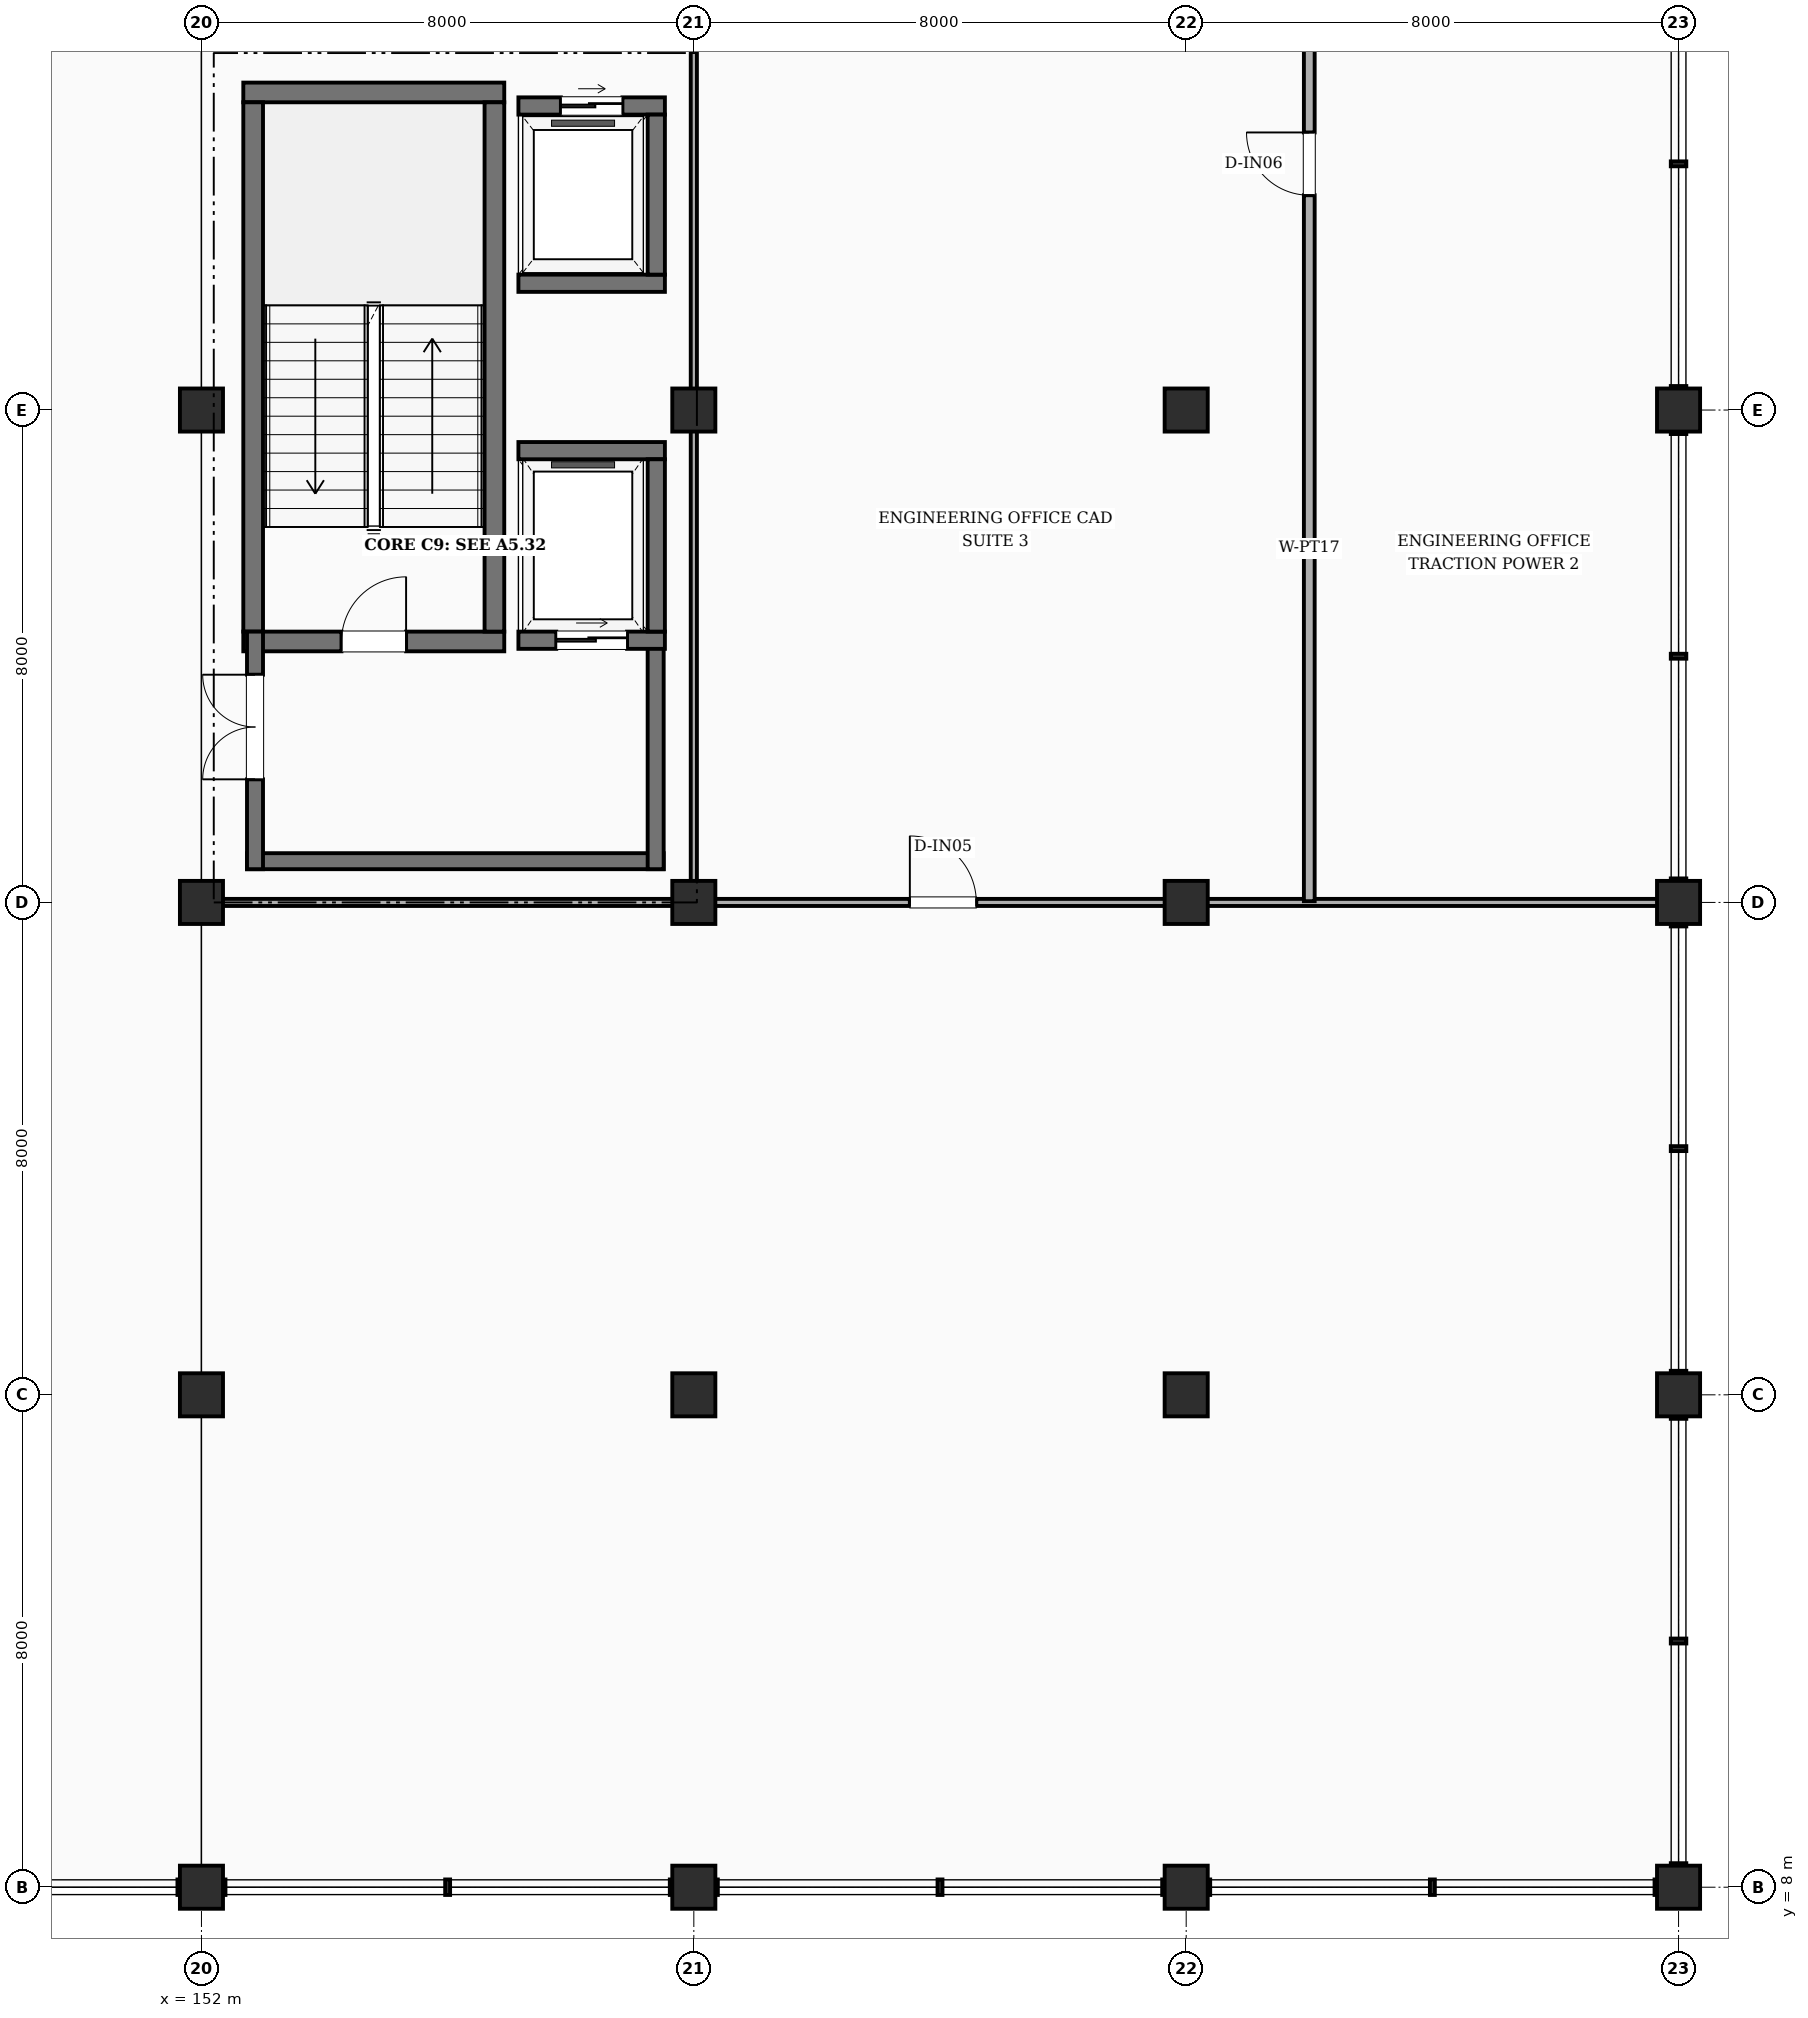
"""IFC4 building model, lengths in metres.
Left out: names, types, materials, properties, quantities, classifications, styles, units other than length and angle.
Written with IfcOpenShell. Run it as: python <this file> out.ifc"""

import sys

from ifc_helpers import new_model, si_unit, direction, frame, frame_2d, origin, origin_2d, place, context, subcontext, project, spatial, rectangle, extrude, element, fill, save


model = new_model("IFC4")
c1 = context("Model", 3, precision=1e-05, world=origin(), true_north=direction((0.0, 1.0)))
c2 = subcontext(c1, "Body", "Model", "MODEL_VIEW")
j1 = project(units=[si_unit("LENGTHUNIT", "METRE"), si_unit("PLANEANGLEUNIT", "RADIAN")], contexts=[c1])
p1 = place(None, origin())
s1 = spatial("IfcSite", under=j1, at=p1, CompositionType="ELEMENT")
p2 = place(p1, origin())
s2 = spatial("IfcBuilding", under=s1, at=p2, CompositionType="ELEMENT")
p3 = place(p2, frame((0.0, 0.0, 10.8)))
s3 = spatial("IfcBuildingStorey", under=s2, at=p3, CompositionType="ELEMENT", Elevation=10.8)
for number, where, z_axis, x_axis in (
    (1, (152.0, 8.0, 0.0), (0.0, 0.0, 1.0), (1.0, 0.0, 0.0)),
    (2, (152.0, 16.0, 0.0), (0.0, 0.0, 1.0), (1.0, 0.0, 0.0)),
    (3, (152.0, 24.0, 0.0), (0.0, 0.0, 1.0), (1.0, 0.0, 0.0)),
    (4, (152.0, 32.0, 0.0), (0.0, 0.0, 1.0), (1.0, 0.0, 0.0)),
    (5, (160.0, 8.0, 0.0), (0.0, 0.0, 1.0), (1.0, 0.0, 0.0)),
    (6, (160.0, 16.0, 0.0), (0.0, 0.0, 1.0), (1.0, 0.0, 0.0)),
    (7, (160.0, 24.0, 0.0), (0.0, 0.0, 1.0), (1.0, 0.0, 0.0)),
    (8, (160.0, 32.0, 0.0), (0.0, 0.0, 1.0), (1.0, 0.0, 0.0)),
    (9, (168.0, 8.0, 0.0), (0.0, 0.0, 1.0), (1.0, 0.0, 0.0)),
    (10, (168.0, 16.0, 0.0), (0.0, 0.0, 1.0), (1.0, 0.0, 0.0)),
    (11, (168.0, 24.0, 0.0), (0.0, 0.0, 1.0), (1.0, 0.0, 0.0)),
    (12, (168.0, 32.0, 0.0), (0.0, 0.0, 1.0), (1.0, 0.0, 0.0)),
    (13, (176.0, 8.0, 0.0), (0.0, 0.0, 1.0), (1.0, 0.0, 0.0)),
    (14, (176.0, 16.0, 0.0), (0.0, 0.0, 1.0), (1.0, 0.0, 0.0)),
    (15, (176.0, 24.0, 0.0), (0.0, 0.0, 1.0), (1.0, 0.0, 0.0)),
    (16, (176.0, 32.0, 0.0), (0.0, 0.0, 1.0), (1.0, 0.0, 0.0)),
):
    element("IfcColumn", number, at=place(p3, frame(where, z_axis=z_axis, x_axis=x_axis)), inside=s3, PredefinedType="COLUMN", context=c2, shape_type="SweptSolid", body=[
        extrude(rectangle(XDim=0.7, YDim=0.7, at=origin_2d()), origin(), (0.0, 0.0, 1.0), 4.2),
    ])
p4 = place(p3, frame((152.68, 28.24, 0.0), z_axis=(0.0, 0.0, 1.0), x_axis=(1.0, 0.0, 0.0)))
e17 = element("IfcWall", 17, at=p4, inside=s3, PredefinedType="SHEAR", context=c2, shape_type="SweptSolid", body=[
    extrude(rectangle(XDim=4.24, YDim=0.32, at=frame_2d((2.12, 0.0))), origin(), (0.0, 0.0, 1.0), 4.2),
])
p5 = place(p4, frame((1.595, 0.0, 0.0)))
e18 = element("IfcOpeningElement", 18, at=p5, cuts=e17, PredefinedType="OPENING", context=c2, shape_type="SweptSolid", body=[
    extrude(rectangle(XDim=1.05, YDim=2.15, at=frame_2d((0.525, 1.075))), frame((0.0, 0.17, 0.0), z_axis=(0.0, -1.0, 0.0), x_axis=(1.0, 0.0, 0.0)), (0.0, 0.0, 1.0), 0.34),
])
p6 = place(p3, frame((152.68, 37.16, 0.0), z_axis=(0.0, 0.0, 1.0), x_axis=(1.0, 0.0, 0.0)))
e19 = element("IfcWall", 19, at=p6, inside=s3, PredefinedType="SHEAR", context=c2, shape_type="SweptSolid", body=[
    extrude(rectangle(XDim=4.24, YDim=0.32, at=frame_2d((2.12, 0.0))), origin(), (0.0, 0.0, 1.0), 4.2),
])
for number, where, z_axis, x_axis in (
    (20, (152.84, 28.4, 0.0), (0.0, 0.0, 1.0), (0.0, 1.0, 0.0)),
    (21, (156.76, 28.4, 0.0), (0.0, 0.0, 1.0), (0.0, 1.0, 0.0)),
):
    element("IfcWall", number, at=place(p3, frame(where, z_axis=z_axis, x_axis=x_axis)), inside=s3, PredefinedType="SHEAR", context=c2, shape_type="SweptSolid", body=[
        extrude(rectangle(XDim=8.6, YDim=0.32, at=frame_2d((4.3, 0.0))), origin(), (0.0, 0.0, 1.0), 4.2),
    ])
p7 = place(p3, frame((159.51, 24.67, 0.0), z_axis=(0.0, 0.0, 1.0), x_axis=(-1.0, 0.0, 0.0)))
e22 = element("IfcWall", 22, at=p7, inside=s3, PredefinedType="SHEAR", context=c2, shape_type="SweptSolid", body=[
    extrude(rectangle(XDim=6.77, YDim=0.26, at=frame_2d((3.385, 0.0))), origin(), (0.0, 0.0, 1.0), 4.2),
])
p8 = place(p3, frame((152.87, 24.54, 0.0), z_axis=(0.0, 0.0, 1.0), x_axis=(0.0, 1.0, 0.0)))
e23 = element("IfcWall", 23, at=p8, inside=s3, PredefinedType="SHEAR", context=c2, shape_type="SweptSolid", body=[
    extrude(rectangle(XDim=3.86, YDim=0.26, at=frame_2d((1.93, 0.0))), origin(), (0.0, 0.0, 1.0), 4.2),
])
p9 = place(p8, frame((1.46, 0.0, 0.0)))
e24 = element("IfcOpeningElement", 24, at=p9, cuts=e23, PredefinedType="OPENING", context=c2, shape_type="SweptSolid", body=[
    extrude(rectangle(XDim=1.7, YDim=2.2, at=frame_2d((0.85, 1.1))), frame((0.0, 0.14, 0.0), z_axis=(0.0, -1.0, 0.0), x_axis=(1.0, 0.0, 0.0)), (0.0, 0.0, 1.0), 0.28),
])
p10 = place(p3, frame((159.38, 24.54, 0.0), z_axis=(0.0, 0.0, 1.0), x_axis=(0.0, 1.0, 0.0)))
e25 = element("IfcWall", 25, at=p10, inside=s3, PredefinedType="SHEAR", context=c2, shape_type="SweptSolid", body=[
    extrude(rectangle(XDim=3.86, YDim=0.26, at=frame_2d((1.93, 0.0))), origin(), (0.0, 0.0, 1.0), 4.2),
])
p11 = place(p3, frame((157.15, 28.26, 0.0), z_axis=(0.0, 0.0, 1.0), x_axis=(1.0, 0.0, 0.0)))
e26 = element("IfcWall", 26, at=p11, inside=s3, PredefinedType="SHEAR", context=c2, shape_type="SweptSolid", body=[
    extrude(rectangle(XDim=2.38, YDim=0.28, at=frame_2d((1.19, 0.0))), origin(), (0.0, 0.0, 1.0), 4.2),
])
p12 = place(p11, frame((0.615, 0.0, 0.0)))
e27 = element("IfcOpeningElement", 27, at=p12, cuts=e26, PredefinedType="OPENING", context=c2, shape_type="SweptSolid", body=[
    extrude(rectangle(XDim=1.15, YDim=2.2, at=frame_2d((0.575, 1.1))), frame((0.0, 0.15, 0.0), z_axis=(0.0, -1.0, 0.0), x_axis=(1.0, 0.0, 0.0)), (0.0, 0.0, 1.0), 0.3),
])
p13 = place(p3, frame((157.15, 31.34, 0.0), z_axis=(0.0, 0.0, 1.0), x_axis=(1.0, 0.0, 0.0)))
e28 = element("IfcWall", 28, at=p13, inside=s3, PredefinedType="SHEAR", context=c2, shape_type="SweptSolid", body=[
    extrude(rectangle(XDim=2.38, YDim=0.28, at=frame_2d((1.19, 0.0))), origin(), (0.0, 0.0, 1.0), 4.2),
])
p14 = place(p3, frame((159.39, 28.4, 0.0), z_axis=(0.0, 0.0, 1.0), x_axis=(0.0, 1.0, 0.0)))
e29 = element("IfcWall", 29, at=p14, inside=s3, PredefinedType="SHEAR", context=c2, shape_type="SweptSolid", body=[
    extrude(rectangle(XDim=2.8, YDim=0.28, at=frame_2d((1.4, 0.0))), origin(), (0.0, 0.0, 1.0), 4.2),
])
p15 = place(p3, frame((157.15, 34.06, 0.0), z_axis=(0.0, 0.0, 1.0), x_axis=(1.0, 0.0, 0.0)))
e30 = element("IfcWall", 30, at=p15, inside=s3, PredefinedType="SHEAR", context=c2, shape_type="SweptSolid", body=[
    extrude(rectangle(XDim=2.38, YDim=0.28, at=frame_2d((1.19, 0.0))), origin(), (0.0, 0.0, 1.0), 4.2),
])
p16 = place(p3, frame((157.15, 36.94, 0.0), z_axis=(0.0, 0.0, 1.0), x_axis=(1.0, 0.0, 0.0)))
e31 = element("IfcWall", 31, at=p16, inside=s3, PredefinedType="SHEAR", context=c2, shape_type="SweptSolid", body=[
    extrude(rectangle(XDim=2.38, YDim=0.28, at=frame_2d((1.19, 0.0))), origin(), (0.0, 0.0, 1.0), 4.2),
])
p17 = place(p16, frame((0.69, 0.0, 0.0)))
e32 = element("IfcOpeningElement", 32, at=p17, cuts=e31, PredefinedType="OPENING", context=c2, shape_type="SweptSolid", body=[
    extrude(rectangle(XDim=1.0, YDim=2.15, at=frame_2d((0.5, 1.075))), frame((0.0, 0.15, 0.0), z_axis=(0.0, -1.0, 0.0), x_axis=(1.0, 0.0, 0.0)), (0.0, 0.0, 1.0), 0.3),
])
p18 = place(p3, frame((159.39, 34.2, 0.0), z_axis=(0.0, 0.0, 1.0), x_axis=(0.0, 1.0, 0.0)))
e33 = element("IfcWall", 33, at=p18, inside=s3, PredefinedType="SHEAR", context=c2, shape_type="SweptSolid", body=[
    extrude(rectangle(XDim=2.6, YDim=0.28, at=frame_2d((1.3, 0.0))), origin(), (0.0, 0.0, 1.0), 4.2),
])
p19 = place(p3, frame((152.22, 24.0, 0.0), z_axis=(0.0, 0.0, 1.0), x_axis=(1.0, 0.0, 0.0)))
e34 = element("IfcWall", 34, at=p19, inside=s3, PredefinedType="PARTITIONING", context=c2, shape_type="SweptSolid", body=[
    extrude(rectangle(XDim=23.66, YDim=0.115, at=frame_2d((11.83, 0.0))), origin(), (0.0, 0.0, 1.0), 3.25),
])
p20 = place(p19, frame((11.29, 0.0, 0.0)))
e35 = element("IfcOpeningElement", 35, at=p20, cuts=e34, PredefinedType="OPENING", context=c2, shape_type="SweptSolid", body=[
    extrude(rectangle(XDim=1.08, YDim=2.15, at=frame_2d((0.54, 1.075))), frame((0.0, 0.067, 0.0), z_axis=(0.0, -1.0, 0.0), x_axis=(1.0, 0.0, 0.0)), (0.0, 0.0, 1.0), 0.135),
])
p21 = place(p3, frame((160.0, 24.02, 0.0), z_axis=(0.0, 0.0, 1.0), x_axis=(0.0, 1.0, 0.0)))
e36 = element("IfcWall", 36, at=p21, inside=s3, PredefinedType="PARTITIONING", context=c2, shape_type="SweptSolid", body=[
    extrude(rectangle(XDim=19.16, YDim=0.1, at=frame_2d((9.58, 0.0))), origin(), (0.0, 0.0, 1.0), 3.25),
])
p22 = place(p3, frame((170.0, 24.02, 0.0), z_axis=(0.0, 0.0, 1.0), x_axis=(0.0, 1.0, 0.0)))
e37 = element("IfcWall", 37, at=p22, inside=s3, PredefinedType="PARTITIONING", context=c2, shape_type="SweptSolid", body=[
    extrude(rectangle(XDim=23.96, YDim=0.175, at=frame_2d((11.98, 0.0))), origin(), (0.0, 0.0, 1.0), 3.25),
])
p23 = place(p22, frame((11.47, 0.0, 0.0)))
e38 = element("IfcOpeningElement", 38, at=p23, cuts=e37, PredefinedType="OPENING", context=c2, shape_type="SweptSolid", body=[
    extrude(rectangle(XDim=1.02, YDim=2.12, at=frame_2d((0.51, 1.06))), frame((0.0, 0.097, 0.0), z_axis=(0.0, -1.0, 0.0), x_axis=(1.0, 0.0, 0.0)), (0.0, 0.0, 1.0), 0.195),
])
p24 = place(p5, origin())
e39 = element("IfcDoor", 39, at=p24, inside=s3, OperationType="SINGLE_SWING_RIGHT", PredefinedType="DOOR", context=c2, shape_type="SweptSolid", body=[
    extrude(rectangle(XDim=1.05, YDim=2.15, at=frame_2d((0.525, 1.075))), frame((0.0, 0.025, 0.0), z_axis=(0.0, -1.0, 0.0), x_axis=(1.0, 0.0, 0.0)), (0.0, 0.0, 1.0), 0.05),
])
fill(e18, e39)
p25 = place(p9, origin())
e40 = element("IfcDoor", 40, at=p25, inside=s3, OperationType="DOUBLE_DOOR_SINGLE_SWING", PredefinedType="DOOR", context=c2, shape_type="SweptSolid", body=[
    extrude(rectangle(XDim=1.7, YDim=2.2, at=frame_2d((0.85, 1.1))), frame((0.0, 0.025, 0.0), z_axis=(0.0, -1.0, 0.0), x_axis=(1.0, 0.0, 0.0)), (0.0, 0.0, 1.0), 0.05),
])
fill(e24, e40)
p26 = place(p12, origin())
e41 = element("IfcDoor", 41, at=p26, inside=s3, OperationType="SLIDING_TO_LEFT", PredefinedType="DOOR", context=c2, shape_type="SweptSolid", body=[
    extrude(rectangle(XDim=1.15, YDim=2.2, at=frame_2d((0.575, 1.1))), frame((0.0, 0.025, 0.0), z_axis=(0.0, -1.0, 0.0), x_axis=(1.0, 0.0, 0.0)), (0.0, 0.0, 1.0), 0.05),
])
fill(e27, e41)
p27 = place(p17, origin())
e42 = element("IfcDoor", 42, at=p27, inside=s3, OperationType="SLIDING_TO_LEFT", PredefinedType="DOOR", context=c2, shape_type="SweptSolid", body=[
    extrude(rectangle(XDim=1.0, YDim=2.15, at=frame_2d((0.5, 1.075))), frame((0.0, 0.025, 0.0), z_axis=(0.0, -1.0, 0.0), x_axis=(1.0, 0.0, 0.0)), (0.0, 0.0, 1.0), 0.05),
])
fill(e32, e42)
p28 = place(p20, origin())
e43 = element("IfcDoor", 43, at=p28, inside=s3, OperationType="SINGLE_SWING_LEFT", PredefinedType="DOOR", context=c2, shape_type="SweptSolid", body=[
    extrude(rectangle(XDim=1.08, YDim=2.15, at=frame_2d((0.54, 1.075))), frame((0.0, 0.025, 0.0), z_axis=(0.0, -1.0, 0.0), x_axis=(1.0, 0.0, 0.0)), (0.0, 0.0, 1.0), 0.05),
])
fill(e35, e43)
p29 = place(p23, origin())
e44 = element("IfcDoor", 44, at=p29, inside=s3, OperationType="SINGLE_SWING_RIGHT", PredefinedType="DOOR", context=c2, shape_type="SweptSolid", body=[
    extrude(rectangle(XDim=1.02, YDim=2.12, at=frame_2d((0.51, 1.06))), frame((0.0, 0.025, 0.0), z_axis=(0.0, -1.0, 0.0), x_axis=(1.0, 0.0, 0.0)), (0.0, 0.0, 1.0), 0.05),
])
fill(e38, e44)
save(model, sys.argv[1])
